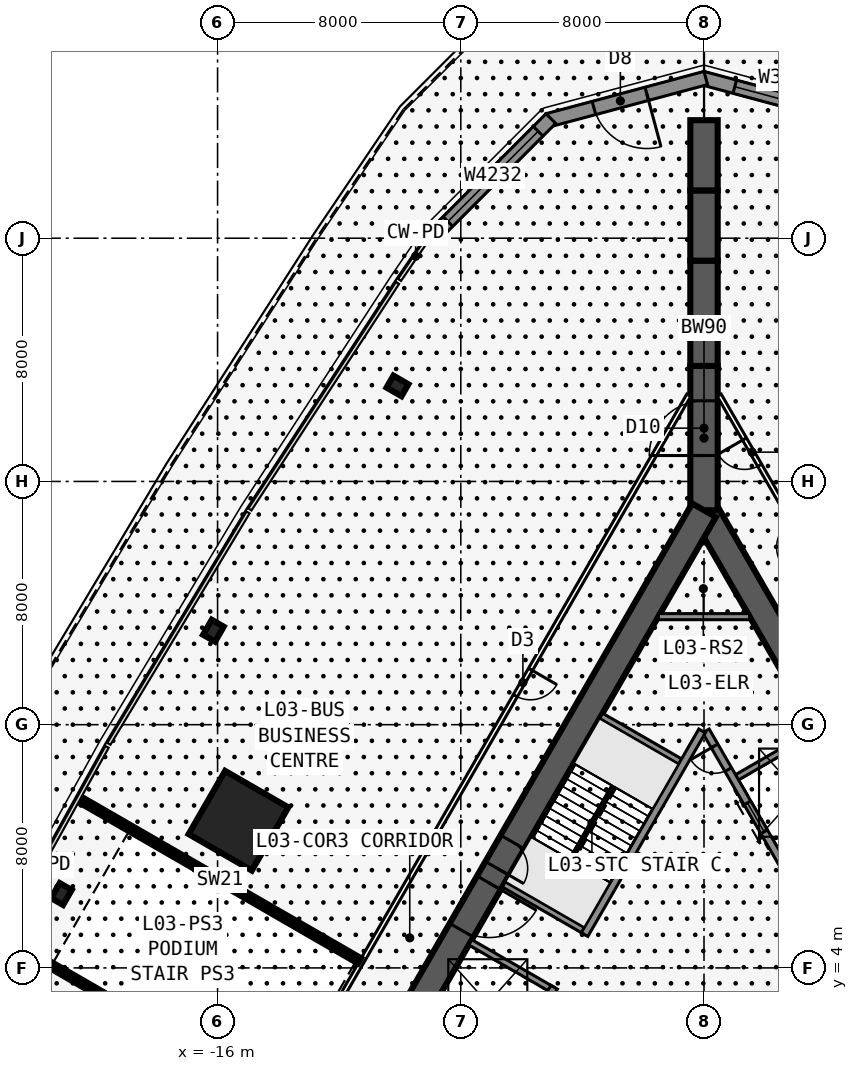
"""IFC4 building model, lengths in metres.
Left out: names, types, materials, properties, quantities, classifications, styles, units other than length and angle.
Written with IfcOpenShell. Run it as: python <this file> out.ifc"""

import sys

from ifc_helpers import new_model, si_unit, direction, frame, frame_2d, origin, origin_2d, place, context, subcontext, project, spatial, rectangle, i_section, extrude, element, fill, save


model = new_model("IFC4")
c1 = context("Model", 3, precision=1e-05, world=origin(), true_north=direction((0.0, 1.0)))
c2 = subcontext(c1, "Body", "Model", "MODEL_VIEW")
j1 = project(units=[si_unit("LENGTHUNIT", "METRE"), si_unit("PLANEANGLEUNIT", "RADIAN")], contexts=[c1])
p1 = place(None, origin())
s1 = spatial("IfcSite", under=j1, at=p1, CompositionType="ELEMENT")
p2 = place(p1, origin())
s2 = spatial("IfcBuilding", under=s1, at=p2, CompositionType="ELEMENT")
p3 = place(p2, frame((0.0, 0.0, 17.5)))
s3 = spatial("IfcBuildingStorey", under=s2, at=p3, CompositionType="ELEMENT", Elevation=17.5)
p4 = place(p3, frame((16.5, -9.526, 0.0), z_axis=(0.0, 0.0, 1.0), x_axis=(-0.499999749417, 0.866025548458, 0.0)))
e1 = element("IfcWall", 1, at=p4, inside=s3, PredefinedType="SHEAR", context=c2, shape_type="SweptSolid", body=[
    extrude(rectangle(XDim=33.0, YDim=0.9, at=frame_2d((16.5, 0.0))), origin(), (0.0, 0.0, 1.0), 5.0),
])
p5 = place(p4, frame((14.15, 0.0, 0.0)))
e2 = element("IfcOpeningElement", 2, at=p5, cuts=e1, PredefinedType="OPENING", context=c2, shape_type="SweptSolid", body=[
    extrude(rectangle(XDim=1.8, YDim=2.13, at=frame_2d((0.9, 1.065))), frame((0.0, 0.46, 0.0), z_axis=(0.0, -1.0, 0.0), x_axis=(1.0, 0.0, 0.0)), (0.0, 0.0, 1.0), 0.92),
])
p6 = place(p4, frame((12.6, 0.0, 0.0)))
e3 = element("IfcOpeningElement", 3, at=p6, cuts=e1, PredefinedType="OPENING", context=c2, shape_type="SweptSolid", body=[
    extrude(rectangle(XDim=1.0, YDim=2.13, at=frame_2d((0.5, 1.065))), frame((0.0, 0.46, 0.0), z_axis=(0.0, -1.0, 0.0), x_axis=(1.0, 0.0, 0.0)), (0.0, 0.0, 1.0), 0.92),
])
p7 = place(p3, frame((5.379, 2.586, 0.0), z_axis=(0.0, 0.0, 1.0), x_axis=(-0.500001375892, 0.866024609411, 0.0)))
e4 = element("IfcWall", 4, at=p7, inside=s3, PredefinedType="SOLIDWALL", context=c2, shape_type="SweptSolid", body=[
    extrude(rectangle(XDim=10.633, YDim=0.25, at=frame_2d((5.316, 0.0))), origin(), (0.0, 0.0, 1.0), 4.75),
])
p8 = place(p7, frame((9.164, 0.0, 0.0)))
e5 = element("IfcOpeningElement", 5, at=p8, cuts=e4, PredefinedType="OPENING", context=c2, shape_type="SweptSolid", body=[
    extrude(rectangle(XDim=0.9, YDim=2.13, at=frame_2d((0.45, 1.065))), frame((0.0, 0.135, 0.0), z_axis=(0.0, -1.0, 0.0), x_axis=(1.0, 0.0, 0.0)), (0.0, 0.0, 1.0), 0.27),
])
p9 = place(p7, frame((1.0, 0.0, 0.0)))
e6 = element("IfcOpeningElement", 6, at=p9, cuts=e4, PredefinedType="OPENING", context=c2, shape_type="SweptSolid", body=[
    extrude(rectangle(XDim=1.1, YDim=2.13, at=frame_2d((0.55, 1.065))), frame((0.0, 0.135, 0.0), z_axis=(0.0, -1.0, 0.0), x_axis=(1.0, 0.0, 0.0)), (0.0, 0.0, 1.0), 0.27),
])
p10 = place(p7, frame((3.9, 0.0, 0.0)))
e7 = element("IfcOpeningElement", 7, at=p10, cuts=e4, PredefinedType="OPENING", context=c2, shape_type="SweptSolid", body=[
    extrude(rectangle(XDim=1.1, YDim=2.13, at=frame_2d((0.55, 1.065))), frame((0.0, 0.135, 0.0), z_axis=(0.0, -1.0, 0.0), x_axis=(1.0, 0.0, 0.0)), (0.0, 0.0, 1.0), 0.27),
])
p11 = place(p7, frame((6.8, 0.0, 0.0)))
e8 = element("IfcOpeningElement", 8, at=p11, cuts=e4, PredefinedType="OPENING", context=c2, shape_type="SweptSolid", body=[
    extrude(rectangle(XDim=1.1, YDim=2.13, at=frame_2d((0.55, 1.065))), frame((0.0, 0.135, 0.0), z_axis=(0.0, -1.0, 0.0), x_axis=(1.0, 0.0, 0.0)), (0.0, 0.0, 1.0), 0.27),
])
for number, where, z_axis, x_axis in (
    (9, (2.429, 7.696, 0.0), (0.0, 0.0, 1.0), (0.866, 0.5, 0.0)),
    (10, (0.979, 10.207, 0.0), (0.0, 0.0, 1.0), (0.866, 0.5, 0.0)),
):
    element("IfcWall", number, at=place(p3, frame(where, z_axis=z_axis, x_axis=x_axis)), inside=s3, PredefinedType="SOLIDWALL", context=c2, shape_type="SweptSolid", body=[
        extrude(rectangle(XDim=3.125, YDim=0.2, at=frame_2d((1.562, 0.0))), origin(), (0.0, 0.0, 1.0), 4.75),
    ])
p12 = place(p3, frame((0.0, 19.052, 0.0), z_axis=(0.0, 0.0, 1.0), x_axis=(-0.499999749417, -0.866025548458, 0.0)))
e11 = element("IfcWall", 11, at=p12, inside=s3, PredefinedType="SHEAR", context=c2, shape_type="SweptSolid", body=[
    extrude(rectangle(XDim=33.0, YDim=0.9, at=frame_2d((16.5, 0.0))), origin(), (0.0, 0.0, 1.0), 5.0),
])
p13 = place(p12, frame((14.15, 0.0, 0.0)))
e12 = element("IfcOpeningElement", 12, at=p13, cuts=e11, PredefinedType="OPENING", context=c2, shape_type="SweptSolid", body=[
    extrude(rectangle(XDim=1.8, YDim=2.13, at=frame_2d((0.9, 1.065))), frame((0.0, 0.46, 0.0), z_axis=(0.0, -1.0, 0.0), x_axis=(1.0, 0.0, 0.0)), (0.0, 0.0, 1.0), 0.92),
])
p14 = place(p12, frame((12.6, 0.0, 0.0)))
e13 = element("IfcOpeningElement", 13, at=p14, cuts=e11, PredefinedType="OPENING", context=c2, shape_type="SweptSolid", body=[
    extrude(rectangle(XDim=1.0, YDim=2.13, at=frame_2d((0.5, 1.065))), frame((0.0, 0.46, 0.0), z_axis=(0.0, -1.0, 0.0), x_axis=(1.0, 0.0, 0.0)), (0.0, 0.0, 1.0), 0.92),
])
p15 = place(p3, frame((-0.062, 11.794, 0.0), z_axis=(0.0, 0.0, 1.0), x_axis=(-0.500006680225, -0.86602154692, 0.0)))
e14 = element("IfcWall", 14, at=p15, inside=s3, PredefinedType="SOLIDWALL", context=c2, shape_type="SweptSolid", body=[
    extrude(rectangle(XDim=7.733, YDim=0.25, at=frame_2d((3.866, 0.0))), origin(), (0.0, 0.0, 1.0), 4.75),
])
p16 = place(p3, frame((-4.929, 3.365, 0.0), z_axis=(0.0, 0.0, 1.0), x_axis=(-0.499991433582, -0.866030349552, 0.0)))
e15 = element("IfcWall", 15, at=p16, inside=s3, PredefinedType="SOLIDWALL", context=c2, shape_type="SweptSolid", body=[
    extrude(rectangle(XDim=10.633, YDim=0.25, at=frame_2d((5.316, 0.0))), origin(), (0.0, 0.0, 1.0), 4.75),
])
p17 = place(p16, frame((9.164, 0.0, 0.0)))
e16 = element("IfcOpeningElement", 16, at=p17, cuts=e15, PredefinedType="OPENING", context=c2, shape_type="SweptSolid", body=[
    extrude(rectangle(XDim=0.9, YDim=2.13, at=frame_2d((0.45, 1.065))), frame((0.0, 0.135, 0.0), z_axis=(0.0, -1.0, 0.0), x_axis=(1.0, 0.0, 0.0)), (0.0, 0.0, 1.0), 0.27),
])
for number, where, z_axis, x_axis in (
    (17, (-0.679, 10.727, 0.0), (0.0, 0.0, 1.0), (-0.866, 0.5, 0.0)),
    (18, (-3.879, 5.184, 0.0), (0.0, 0.0, 1.0), (-0.866, 0.5, 0.0)),
    (19, (-4.979, 3.279, 0.0), (0.0, 0.0, 1.0), (-0.866, 0.5, 0.0)),
):
    element("IfcWall", number, at=place(p3, frame(where, z_axis=z_axis, x_axis=x_axis)), inside=s3, PredefinedType="SOLIDWALL", context=c2, shape_type="SweptSolid", body=[
        extrude(rectangle(XDim=3.125, YDim=0.2, at=frame_2d((1.562, 0.0))), origin(), (0.0, 0.0, 1.0), 4.75),
    ])
p18 = place(p3, frame((0.0, 19.052, 0.0), z_axis=(0.0, 0.0, 1.0), x_axis=(0.0, 1.0, 0.0)))
e20 = element("IfcWall", 20, at=p18, inside=s3, PredefinedType="SHEAR", context=c2, shape_type="SweptSolid", body=[
    extrude(rectangle(XDim=4.746, YDim=0.9, at=frame_2d((2.373, 0.0))), origin(), (0.0, 0.0, 1.0), 5.0),
])
p19 = place(p18, frame((1.8, 0.0, 0.0)))
e21 = element("IfcOpeningElement", 21, at=p19, cuts=e20, PredefinedType="OPENING", context=c2, shape_type="SweptSolid", body=[
    extrude(rectangle(XDim=1.8, YDim=2.13, at=frame_2d((0.9, 1.065))), frame((0.0, 0.46, 0.0), z_axis=(0.0, -1.0, 0.0), x_axis=(1.0, 0.0, 0.0)), (0.0, 0.0, 1.0), 0.92),
])
p20 = place(p3, frame((0.0, 23.799, 0.0), z_axis=(0.0, 0.0, 1.0), x_axis=(0.0, 1.0, 0.0)))
e22 = element("IfcWall", 22, at=p20, inside=s3, PredefinedType="SHEAR", context=c2, shape_type="SweptSolid", body=[
    extrude(rectangle(XDim=1.155, YDim=0.9, at=frame_2d((0.577, 0.0))), origin(), (0.0, 0.0, 1.0), 5.0),
])
p21 = place(p3, frame((0.0, 24.953, 0.0), z_axis=(0.0, 0.0, 1.0), x_axis=(0.0, 1.0, 0.0)))
e23 = element("IfcWall", 23, at=p21, inside=s3, PredefinedType="SHEAR", context=c2, shape_type="SweptSolid", body=[
    extrude(rectangle(XDim=2.309, YDim=0.9, at=frame_2d((1.155, 0.0))), origin(), (0.0, 0.0, 1.0), 5.0),
])
p22 = place(p3, frame((0.0, 27.263, 0.0), z_axis=(0.0, 0.0, 1.0), x_axis=(0.0, 1.0, 0.0)))
e24 = element("IfcWall", 24, at=p22, inside=s3, PredefinedType="SHEAR", context=c2, shape_type="SweptSolid", body=[
    extrude(rectangle(XDim=2.31, YDim=0.9, at=frame_2d((1.155, 0.0))), origin(), (0.0, 0.0, 1.0), 5.0),
])
p23 = place(p3, frame((0.0, 29.572, 0.0), z_axis=(0.0, 0.0, 1.0), x_axis=(0.0, 1.0, 0.0)))
e25 = element("IfcWall", 25, at=p23, inside=s3, PredefinedType="SHEAR", context=c2, shape_type="SweptSolid", body=[
    extrude(rectangle(XDim=2.309, YDim=0.9, at=frame_2d((1.155, 0.0))), origin(), (0.0, 0.0, 1.0), 5.0),
])
for number, where, z_axis, x_axis in (
    (26, (-10.083, 23.142, 0.0), (0.0, 0.0, 1.0), (-0.5, -0.866, 0.0)),
    (27, (-16.137, 15.09, 0.0), (0.0, 0.0, 1.0), (-0.866, 0.5, 0.0)),
    (28, (-21.137, 6.43, 0.0), (0.0, 0.0, 1.0), (-0.866, 0.5, 0.0)),
):
    element("IfcColumn", number, at=place(p3, frame(where, z_axis=z_axis, x_axis=x_axis)), inside=s3, PredefinedType="COLUMN", context=c2, shape_type="SweptSolid", body=[
        extrude(i_section(OverallWidth=0.455, OverallDepth=0.569, WebThickness=0.078, FlangeThickness=0.125, at=origin_2d()), origin(), (0.0, 0.0, 1.0), 5.0),
    ])
p24 = place(p3, frame((-15.312, 8.84, 0.0), z_axis=(0.0, 0.0, 1.0), x_axis=(-0.866025403784, 0.5, 0.0)))
e29 = element("IfcColumn", 29, at=p24, inside=s3, PredefinedType="COLUMN", context=c2, shape_type="SweptSolid", body=[
    extrude(rectangle(XDim=2.4, YDim=2.4, at=origin_2d()), origin(), (0.0, 0.0, 1.0), 5.0),
])
p25 = place(p3, frame((5.138, 31.877, 0.0), z_axis=(0.0, 0.0, 1.0), x_axis=(-0.965923133363, 0.258829095032, 0.0)))
e30 = element("IfcWall", 30, at=p25, inside=s3, PredefinedType="SOLIDWALL", context=c2, shape_type="SweptSolid", body=[
    extrude(rectangle(XDim=5.379, YDim=0.45, at=frame_2d((2.69, 0.0))), origin(), (0.0, 0.0, 1.0), 4.75),
])
p26 = place(p25, frame((0.671, 0.0, 0.6)))
e31 = element("IfcOpeningElement", 31, at=p26, cuts=e30, PredefinedType="OPENING", context=c2, shape_type="SweptSolid", body=[
    extrude(rectangle(XDim=3.6, YDim=3.2, at=frame_2d((1.8, 1.6))), frame((0.0, 0.235, 0.0), z_axis=(0.0, -1.0, 0.0), x_axis=(1.0, 0.0, 0.0)), (0.0, 0.0, 1.0), 0.47),
])
p27 = place(p3, frame((0.058, 33.269, 0.0), z_axis=(0.0, 0.0, 1.0), x_axis=(-0.965923133363, -0.258829095032, 0.0)))
e32 = element("IfcWall", 32, at=p27, inside=s3, PredefinedType="SOLIDWALL", context=c2, shape_type="SweptSolid", body=[
    extrude(rectangle(XDim=5.379, YDim=0.45, at=frame_2d((2.69, 0.0))), origin(), (0.0, 0.0, 1.0), 4.75),
])
p28 = place(p27, frame((2.008, 0.0, 0.0)))
e33 = element("IfcOpeningElement", 33, at=p28, cuts=e32, PredefinedType="OPENING", context=c2, shape_type="SweptSolid", body=[
    extrude(rectangle(XDim=1.8, YDim=2.4, at=frame_2d((0.9, 1.2))), frame((0.0, 0.235, 0.0), z_axis=(0.0, -1.0, 0.0), x_axis=(1.0, 0.0, 0.0)), (0.0, 0.0, 1.0), 0.47),
])
p29 = place(p3, frame((-5.037, 31.935, 0.0), z_axis=(0.0, 0.0, 1.0), x_axis=(-0.707106781187, -0.707106781187, 0.0)))
e34 = element("IfcWall", 34, at=p29, inside=s3, PredefinedType="SOLIDWALL", context=c2, shape_type="SweptSolid", body=[
    extrude(rectangle(XDim=5.379, YDim=0.45, at=frame_2d((2.689, 0.0))), origin(), (0.0, 0.0, 1.0), 4.75),
])
p30 = place(p29, frame((0.59, 0.0, 0.6)))
e35 = element("IfcOpeningElement", 35, at=p30, cuts=e34, PredefinedType="OPENING", context=c2, shape_type="SweptSolid", body=[
    extrude(rectangle(XDim=4.2, YDim=3.2, at=frame_2d((2.1, 1.6))), frame((0.0, 0.235, 0.0), z_axis=(0.0, -1.0, 0.0), x_axis=(1.0, 0.0, 0.0)), (0.0, 0.0, 1.0), 0.47),
])
p31 = place(p3, frame((20.027, -10.985, 0.0), z_axis=(0.0, 0.0, 1.0), x_axis=(-0.500001677587, 0.866024435227, 0.0)))
e36 = element("IfcWall", 36, at=p31, inside=s3, PredefinedType="PARTITIONING", context=c2, shape_type="SweptSolid", body=[
    extrude(rectangle(XDim=39.054, YDim=0.15, at=frame_2d((19.527, 0.0))), origin(), (0.0, 0.0, 1.0), 4.75),
])
p32 = place(p31, frame((10.013, 0.0, 0.0)))
e37 = element("IfcOpeningElement", 37, at=p32, cuts=e36, PredefinedType="OPENING", context=c2, shape_type="SweptSolid", body=[
    extrude(rectangle(XDim=1.8, YDim=2.13, at=frame_2d((0.9, 1.065))), frame((0.0, 0.085, 0.0), z_axis=(0.0, -1.0, 0.0), x_axis=(1.0, 0.0, 0.0)), (0.0, 0.0, 1.0), 0.17),
])
p33 = place(p31, frame((23.227, 0.0, 0.0)))
e38 = element("IfcOpeningElement", 38, at=p33, cuts=e36, PredefinedType="OPENING", context=c2, shape_type="SweptSolid", body=[
    extrude(rectangle(XDim=1.8, YDim=2.13, at=frame_2d((0.9, 1.065))), frame((0.0, 0.085, 0.0), z_axis=(0.0, -1.0, 0.0), x_axis=(1.0, 0.0, 0.0)), (0.0, 0.0, 1.0), 0.17),
])
p34 = place(p31, frame((27.627, 0.0, 0.0)))
e39 = element("IfcOpeningElement", 39, at=p34, cuts=e36, PredefinedType="OPENING", context=c2, shape_type="SweptSolid", body=[
    extrude(rectangle(XDim=1.0, YDim=2.13, at=frame_2d((0.5, 1.065))), frame((0.0, 0.085, 0.0), z_axis=(0.0, -1.0, 0.0), x_axis=(1.0, 0.0, 0.0)), (0.0, 0.0, 1.0), 0.17),
])
p35 = place(p31, frame((30.527, 0.0, 0.0)))
e40 = element("IfcOpeningElement", 40, at=p35, cuts=e36, PredefinedType="OPENING", context=c2, shape_type="SweptSolid", body=[
    extrude(rectangle(XDim=1.0, YDim=2.13, at=frame_2d((0.5, 1.065))), frame((0.0, 0.085, 0.0), z_axis=(0.0, -1.0, 0.0), x_axis=(1.0, 0.0, 0.0)), (0.0, 0.0, 1.0), 0.17),
])
p36 = place(p31, frame((33.277, 0.0, 0.0)))
e41 = element("IfcOpeningElement", 41, at=p36, cuts=e36, PredefinedType="OPENING", context=c2, shape_type="SweptSolid", body=[
    extrude(rectangle(XDim=1.0, YDim=2.13, at=frame_2d((0.5, 1.065))), frame((0.0, 0.085, 0.0), z_axis=(0.0, -1.0, 0.0), x_axis=(1.0, 0.0, 0.0)), (0.0, 0.0, 1.0), 0.17),
])
p37 = place(p31, frame((36.39, 0.0, 0.0)))
e42 = element("IfcOpeningElement", 42, at=p37, cuts=e36, PredefinedType="OPENING", context=c2, shape_type="SweptSolid", body=[
    extrude(rectangle(XDim=1.0, YDim=2.13, at=frame_2d((0.5, 1.065))), frame((0.0, 0.085, 0.0), z_axis=(0.0, -1.0, 0.0), x_axis=(1.0, 0.0, 0.0)), (0.0, 0.0, 1.0), 0.17),
])
p38 = place(p3, frame((-0.5, 22.836, 0.0), z_axis=(0.0, 0.0, 1.0), x_axis=(-0.500001677587, -0.866024435227, 0.0)))
e43 = element("IfcWall", 43, at=p38, inside=s3, PredefinedType="PARTITIONING", context=c2, shape_type="SweptSolid", body=[
    extrude(rectangle(XDim=39.054, YDim=0.15, at=frame_2d((19.527, 0.0))), origin(), (0.0, 0.0, 1.0), 4.75),
])
p39 = place(p38, frame((10.414, 0.0, 0.0)))
e44 = element("IfcOpeningElement", 44, at=p39, cuts=e43, PredefinedType="OPENING", context=c2, shape_type="SweptSolid", body=[
    extrude(rectangle(XDim=1.0, YDim=2.13, at=frame_2d((0.5, 1.065))), frame((0.0, 0.085, 0.0), z_axis=(0.0, -1.0, 0.0), x_axis=(1.0, 0.0, 0.0)), (0.0, 0.0, 1.0), 0.17),
])
p40 = place(p38, frame((23.227, 0.0, 0.0)))
e45 = element("IfcOpeningElement", 45, at=p40, cuts=e43, PredefinedType="OPENING", context=c2, shape_type="SweptSolid", body=[
    extrude(rectangle(XDim=1.8, YDim=2.13, at=frame_2d((0.9, 1.065))), frame((0.0, 0.085, 0.0), z_axis=(0.0, -1.0, 0.0), x_axis=(1.0, 0.0, 0.0)), (0.0, 0.0, 1.0), 0.17),
])
p41 = place(p38, frame((27.627, 0.0, 0.0)))
e46 = element("IfcOpeningElement", 46, at=p41, cuts=e43, PredefinedType="OPENING", context=c2, shape_type="SweptSolid", body=[
    extrude(rectangle(XDim=1.0, YDim=2.13, at=frame_2d((0.5, 1.065))), frame((0.0, 0.085, 0.0), z_axis=(0.0, -1.0, 0.0), x_axis=(1.0, 0.0, 0.0)), (0.0, 0.0, 1.0), 0.17),
])
p42 = place(p38, frame((30.277, 0.0, 0.0)))
e47 = element("IfcOpeningElement", 47, at=p42, cuts=e43, PredefinedType="OPENING", context=c2, shape_type="SweptSolid", body=[
    extrude(rectangle(XDim=1.0, YDim=2.13, at=frame_2d((0.5, 1.065))), frame((0.0, 0.085, 0.0), z_axis=(0.0, -1.0, 0.0), x_axis=(1.0, 0.0, 0.0)), (0.0, 0.0, 1.0), 0.17),
])
p43 = place(p38, frame((34.89, 0.0, 0.0)))
e48 = element("IfcOpeningElement", 48, at=p43, cuts=e43, PredefinedType="OPENING", context=c2, shape_type="SweptSolid", body=[
    extrude(rectangle(XDim=1.0, YDim=2.13, at=frame_2d((0.5, 1.065))), frame((0.0, 0.085, 0.0), z_axis=(0.0, -1.0, 0.0), x_axis=(1.0, 0.0, 0.0)), (0.0, 0.0, 1.0), 0.17),
])
p44 = place(p3, frame((-11.329, 4.231, 0.0), z_axis=(0.0, 0.0, 1.0), x_axis=(-0.866022509016, 0.500005013853, 0.0)))
e49 = element("IfcWall", 49, at=p44, inside=s3, PredefinedType="SHEAR", context=c2, shape_type="SweptSolid", body=[
    extrude(rectangle(XDim=10.596, YDim=0.2, at=frame_2d((5.298, 0.0))), origin(), (0.0, 0.0, 1.0), 5.0),
])
p45 = place(p3, frame((-13.928, -0.272, 0.0), z_axis=(0.0, 0.0, 1.0), x_axis=(-0.866031513124, 0.499989418164, 0.0)))
e50 = element("IfcWall", 50, at=p45, inside=s3, PredefinedType="SHEAR", context=c2, shape_type="SweptSolid", body=[
    extrude(rectangle(XDim=10.502, YDim=0.2, at=frame_2d((5.251, 0.0))), origin(), (0.0, 0.0, 1.0), 5.0),
])
p46 = place(p3, frame((-1.501, 15.552, 0.0), z_axis=(0.0, 0.0, 1.0), x_axis=(1.0, 0.0, 0.0)))
e51 = element("IfcWall", 51, at=p46, inside=s3, PredefinedType="SOLIDWALL", context=c2, shape_type="SweptSolid", body=[
    extrude(rectangle(XDim=3.002, YDim=0.2, at=frame_2d((1.501, 0.0))), origin(), (0.0, 0.0, 1.0), 4.75),
])
p47 = place(p3, frame((-2.988, 9.978, 0.0), z_axis=(0.0, 0.0, 1.0), x_axis=(-0.499992232847, -0.866029888106, 0.0)))
e52 = element("IfcWall", 52, at=p47, inside=s3, PredefinedType="SOLIDWALL", context=c2, shape_type="SweptSolid", body=[
    extrude(rectangle(XDim=2.794, YDim=0.1, at=frame_2d((1.397, 0.0))), origin(), (0.0, 0.0, 1.0), 5.0),
])
p48 = place(p26, origin())
e53 = element("IfcWindow", 53, at=p48, inside=s3, PartitioningType="SINGLE_PANEL", PredefinedType="WINDOW", context=c2, shape_type="SweptSolid", body=[
    extrude(rectangle(XDim=3.6, YDim=3.2, at=frame_2d((1.8, 1.6))), frame((0.0, 0.03, 0.0), z_axis=(0.0, -1.0, 0.0), x_axis=(1.0, 0.0, 0.0)), (0.0, 0.0, 1.0), 0.06),
])
fill(e31, e53)
p49 = place(p28, origin())
e54 = element("IfcDoor", 54, at=p49, inside=s3, OperationType="DOUBLE_DOOR_SINGLE_SWING", PredefinedType="DOOR", context=c2, shape_type="SweptSolid", body=[
    extrude(rectangle(XDim=1.8, YDim=2.4, at=frame_2d((0.9, 1.2))), frame((0.0, 0.025, 0.0), z_axis=(0.0, -1.0, 0.0), x_axis=(1.0, 0.0, 0.0)), (0.0, 0.0, 1.0), 0.05),
])
fill(e33, e54)
p50 = place(p30, origin())
e55 = element("IfcWindow", 55, at=p50, inside=s3, PartitioningType="SINGLE_PANEL", PredefinedType="WINDOW", context=c2, shape_type="SweptSolid", body=[
    extrude(rectangle(XDim=4.2, YDim=3.2, at=frame_2d((2.1, 1.6))), frame((0.0, 0.03, 0.0), z_axis=(0.0, -1.0, 0.0), x_axis=(1.0, 0.0, 0.0)), (0.0, 0.0, 1.0), 0.06),
])
fill(e35, e55)
p51 = place(p37, origin())
e56 = element("IfcDoor", 56, at=p51, inside=s3, OperationType="SINGLE_SWING_RIGHT", PredefinedType="DOOR", context=c2, shape_type="SweptSolid", body=[
    extrude(rectangle(XDim=1.0, YDim=2.13, at=frame_2d((0.5, 1.065))), frame((0.0, 0.025, 0.0), z_axis=(0.0, -1.0, 0.0), x_axis=(1.0, 0.0, 0.0)), (0.0, 0.0, 1.0), 0.05),
])
fill(e42, e56)
p52 = place(p39, origin())
e57 = element("IfcDoor", 57, at=p52, inside=s3, OperationType="SINGLE_SWING_LEFT", PredefinedType="DOOR", context=c2, shape_type="SweptSolid", body=[
    extrude(rectangle(XDim=1.0, YDim=2.13, at=frame_2d((0.5, 1.065))), frame((0.0, 0.025, 0.0), z_axis=(0.0, -1.0, 0.0), x_axis=(1.0, 0.0, 0.0)), (0.0, 0.0, 1.0), 0.05),
])
fill(e44, e57)
p53 = place(p13, origin())
e58 = element("IfcDoor", 58, at=p53, inside=s3, OperationType="DOUBLE_DOOR_SINGLE_SWING", PredefinedType="DOOR", context=c2, shape_type="SweptSolid", body=[
    extrude(rectangle(XDim=1.8, YDim=2.13, at=frame_2d((0.9, 1.065))), frame((0.0, 0.025, 0.0), z_axis=(0.0, -1.0, 0.0), x_axis=(1.0, 0.0, 0.0)), (0.0, 0.0, 1.0), 0.05),
])
fill(e12, e58)
p54 = place(p14, origin())
e59 = element("IfcDoor", 59, at=p54, inside=s3, OperationType="SINGLE_SWING_RIGHT", PredefinedType="DOOR", context=c2, shape_type="SweptSolid", body=[
    extrude(rectangle(XDim=1.0, YDim=2.13, at=frame_2d((0.5, 1.065))), frame((0.0, 0.025, 0.0), z_axis=(0.0, -1.0, 0.0), x_axis=(1.0, 0.0, 0.0)), (0.0, 0.0, 1.0), 0.05),
])
fill(e13, e59)
p55 = place(p19, origin())
e60 = element("IfcDoor", 60, at=p55, inside=s3, OperationType="DOUBLE_DOOR_DOUBLE_SWING", PredefinedType="DOOR", context=c2, shape_type="SweptSolid", body=[
    extrude(rectangle(XDim=1.8, YDim=2.13, at=frame_2d((0.9, 1.065))), frame((0.0, 0.025, 0.0), z_axis=(0.0, -1.0, 0.0), x_axis=(1.0, 0.0, 0.0)), (0.0, 0.0, 1.0), 0.05),
])
fill(e21, e60)
p56 = place(p8, origin())
e61 = element("IfcDoor", 61, at=p56, inside=s3, OperationType="SINGLE_SWING_RIGHT", PredefinedType="DOOR", context=c2, shape_type="SweptSolid", body=[
    extrude(rectangle(XDim=0.9, YDim=2.13, at=frame_2d((0.45, 1.065))), frame((0.0, 0.025, 0.0), z_axis=(0.0, -1.0, 0.0), x_axis=(1.0, 0.0, 0.0)), (0.0, 0.0, 1.0), 0.05),
])
fill(e5, e61)
p57 = place(p11, origin())
e62 = element("IfcDoor", 62, at=p57, inside=s3, OperationType="DOUBLE_DOOR_SLIDING", PredefinedType="USERDEFINED", context=c2, shape_type="SweptSolid", body=[
    extrude(rectangle(XDim=1.1, YDim=2.13, at=frame_2d((0.55, 1.065))), frame((0.0, 0.025, 0.0), z_axis=(0.0, -1.0, 0.0), x_axis=(1.0, 0.0, 0.0)), (0.0, 0.0, 1.0), 0.05),
])
fill(e8, e62)
save(model, sys.argv[1])
